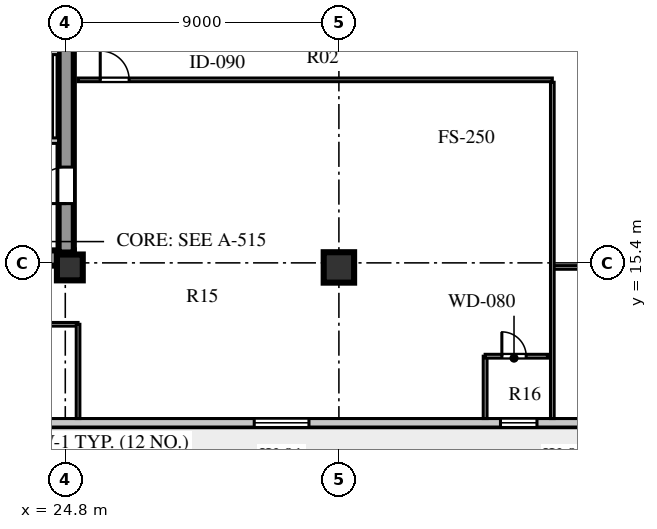
"""IFC4 building model, lengths in metres.
Left out: names, types, materials, properties, quantities, classifications, styles, units other than length and angle.
Written with IfcOpenShell. Run it as: python <this file> out.ifc"""

import sys

from ifc_helpers import new_model, si_unit, direction, frame, frame_2d, origin, origin_2d, place, context, subcontext, project, spatial, rectangle, extrude, element, fill, save


model = new_model("IFC4")
c1 = context("Model", 3, precision=1e-05, world=origin(), true_north=direction((0.0, 1.0)))
c2 = subcontext(c1, "Body", "Model", "MODEL_VIEW")
j1 = project(units=[si_unit("LENGTHUNIT", "METRE"), si_unit("PLANEANGLEUNIT", "RADIAN")], contexts=[c1])
p1 = place(None, origin())
s1 = spatial("IfcSite", under=j1, at=p1, CompositionType="ELEMENT")
p2 = place(p1, origin())
s2 = spatial("IfcBuilding", under=s1, at=p2, CompositionType="ELEMENT")
p3 = place(p2, frame((0.0, 0.0, 111.7)))
s3 = spatial("IfcBuildingStorey", under=s2, at=p3, CompositionType="ELEMENT", Elevation=111.7)
p4 = place(p3, frame((15.4, 15.56, 0.0), z_axis=(0.0, 0.0, 1.0), x_axis=(1.0, 0.0, 0.0)))
e1 = element("IfcWall", 1, at=p4, inside=s3, PredefinedType="SHEAR", context=c2, shape_type="SweptSolid", body=[
    extrude(rectangle(XDim=9.68, YDim=0.5, at=frame_2d((4.84, 0.0))), origin(), (0.0, 0.0, 1.0), 3.6),
])
p5 = place(p3, frame((24.83, 15.74, 0.0), z_axis=(0.0, 0.0, 1.0), x_axis=(0.0, 1.0, 0.0)))
e2 = element("IfcWall", 2, at=p5, inside=s3, PredefinedType="SHEAR", context=c2, shape_type="SweptSolid", body=[
    extrude(rectangle(XDim=25.76, YDim=0.5, at=frame_2d((12.88, 0.0))), origin(), (0.0, 0.0, 1.0), 3.6),
])
p6 = place(p5, frame((1.61, 0.0, 0.0)))
e3 = element("IfcOpeningElement", 3, at=p6, cuts=e2, PredefinedType="OPENING", context=c2, shape_type="SweptSolid", body=[
    extrude(rectangle(XDim=1.2, YDim=2.1, at=frame_2d((0.6, 1.05))), frame((0.0, 0.26, 0.0), z_axis=(0.0, -1.0, 0.0), x_axis=(1.0, 0.0, 0.0)), (0.0, 0.0, 1.0), 0.52),
])
p7 = place(p5, frame((6.78, 0.0, 0.0)))
e4 = element("IfcOpeningElement", 4, at=p7, cuts=e2, PredefinedType="OPENING", context=c2, shape_type="SweptSolid", body=[
    extrude(rectangle(XDim=0.85, YDim=2.06, at=frame_2d((0.425, 1.03))), frame((0.0, 0.26, 0.0), z_axis=(0.0, -1.0, 0.0), x_axis=(1.0, 0.0, 0.0)), (0.0, 0.0, 1.0), 0.52),
])
p8 = place(p5, frame((12.11, 0.0, 0.0)))
e5 = element("IfcOpeningElement", 5, at=p8, cuts=e2, PredefinedType="OPENING", context=c2, shape_type="SweptSolid", body=[
    extrude(rectangle(XDim=1.5, YDim=2.12, at=frame_2d((0.75, 1.06))), frame((0.0, 0.26, 0.0), z_axis=(0.0, -1.0, 0.0), x_axis=(1.0, 0.0, 0.0)), (0.0, 0.0, 1.0), 0.52),
])
p9 = place(p5, frame((20.11, 0.0, 0.0)))
e6 = element("IfcOpeningElement", 6, at=p9, cuts=e2, PredefinedType="OPENING", context=c2, shape_type="SweptSolid", body=[
    extrude(rectangle(XDim=1.2, YDim=2.12, at=frame_2d((0.6, 1.06))), frame((0.0, 0.26, 0.0), z_axis=(0.0, -1.0, 0.0), x_axis=(1.0, 0.0, 0.0)), (0.0, 0.0, 1.0), 0.52),
])
p10 = place(p5, frame((24.01, 0.0, 0.0)))
e7 = element("IfcOpeningElement", 7, at=p10, cuts=e2, PredefinedType="OPENING", context=c2, shape_type="SweptSolid", body=[
    extrude(rectangle(XDim=0.95, YDim=2.1, at=frame_2d((0.475, 1.05))), frame((0.0, 0.26, 0.0), z_axis=(0.0, -1.0, 0.0), x_axis=(1.0, 0.0, 0.0)), (0.0, 0.0, 1.0), 0.52),
])
p11 = place(p3, frame((24.95, 15.25, 0.0), z_axis=(0.0, 0.0, 1.0), x_axis=(1.0, 0.0, 0.0)))
e8 = element("IfcColumn", 8, at=p11, inside=s3, PredefinedType="COLUMN", context=c2, shape_type="SweptSolid", body=[
    extrude(rectangle(XDim=0.85, YDim=0.85, at=origin_2d()), origin(), (0.0, 0.0, 1.0), 3.6),
])
p12 = place(p3, frame((33.8, 15.25, 0.0), z_axis=(0.0, 0.0, 1.0), x_axis=(1.0, 0.0, 0.0)))
e9 = element("IfcColumn", 9, at=p12, inside=s3, PredefinedType="COLUMN", context=c2, shape_type="SweptSolid", body=[
    extrude(rectangle(XDim=1.0, YDim=1.0, at=origin_2d()), origin(), (0.0, 0.0, 1.0), 3.6),
])
p13 = place(p3, frame((13.25, 10.14, 0.0), z_axis=(0.0, 0.0, 1.0), x_axis=(1.0, 0.0, 0.0)))
e10 = element("IfcWall", 10, at=p13, inside=s3, PredefinedType="STANDARD", context=c2, shape_type="SweptSolid", body=[
    extrude(rectangle(XDim=32.1, YDim=0.28, at=frame_2d((16.05, 0.0))), origin(), (0.0, 0.0, 1.0), 3.6),
])
p14 = place(p13, frame((0.95, 0.0, 0.0)))
e11 = element("IfcOpeningElement", 11, at=p14, cuts=e10, PredefinedType="OPENING", context=c2, shape_type="SweptSolid", body=[
    extrude(rectangle(XDim=1.0, YDim=2.05, at=frame_2d((0.5, 1.025))), frame((0.0, 0.15, 0.0), z_axis=(0.0, -1.0, 0.0), x_axis=(1.0, 0.0, 0.0)), (0.0, 0.0, 1.0), 0.3),
])
p15 = place(p13, frame((5.805, 0.0, 0.8)))
e12 = element("IfcOpeningElement", 12, at=p15, cuts=e10, PredefinedType="OPENING", context=c2, shape_type="SweptSolid", body=[
    extrude(rectangle(XDim=2.25, YDim=2.0, at=frame_2d((1.125, 1.0))), frame((0.0, 0.15, 0.0), z_axis=(0.0, -1.0, 0.0), x_axis=(1.0, 0.0, 0.0)), (0.0, 0.0, 1.0), 0.3),
])
p16 = place(p13, frame((17.765, 0.0, 0.8)))
e13 = element("IfcOpeningElement", 13, at=p16, cuts=e10, PredefinedType="OPENING", context=c2, shape_type="SweptSolid", body=[
    extrude(rectangle(XDim=1.8, YDim=2.0, at=frame_2d((0.9, 1.0))), frame((0.0, 0.15, 0.0), z_axis=(0.0, -1.0, 0.0), x_axis=(1.0, 0.0, 0.0)), (0.0, 0.0, 1.0), 0.3),
])
p17 = place(p13, frame((25.865, 0.0, 0.8)))
e14 = element("IfcOpeningElement", 14, at=p17, cuts=e10, PredefinedType="OPENING", context=c2, shape_type="SweptSolid", body=[
    extrude(rectangle(XDim=1.2, YDim=1.75, at=frame_2d((0.6, 0.875))), frame((0.0, 0.15, 0.0), z_axis=(0.0, -1.0, 0.0), x_axis=(1.0, 0.0, 0.0)), (0.0, 0.0, 1.0), 0.3),
])
p18 = place(p13, frame((29.18, 0.0, 0.8)))
e15 = element("IfcOpeningElement", 15, at=p18, cuts=e10, PredefinedType="OPENING", context=c2, shape_type="SweptSolid", body=[
    extrude(rectangle(XDim=1.2, YDim=1.75, at=frame_2d((0.6, 0.875))), frame((0.0, 0.15, 0.0), z_axis=(0.0, -1.0, 0.0), x_axis=(1.0, 0.0, 0.0)), (0.0, 0.0, 1.0), 0.3),
])
p19 = place(p3, frame((19.64, 19.42, 0.0), z_axis=(0.0, 0.0, 1.0), x_axis=(1.0, 0.0, 0.0)))
e16 = element("IfcWall", 16, at=p19, inside=s3, PredefinedType="SOLIDWALL", context=c2, shape_type="SweptSolid", body=[
    extrude(rectangle(XDim=4.94, YDim=0.18, at=frame_2d((2.47, 0.0))), origin(), (0.0, 0.0, 1.0), 3.6),
])
p20 = place(p19, frame((0.72, 0.0, 0.0)))
e17 = element("IfcOpeningElement", 17, at=p20, cuts=e16, PredefinedType="OPENING", context=c2, shape_type="SweptSolid", body=[
    extrude(rectangle(XDim=1.1, YDim=2.1, at=frame_2d((0.55, 1.05))), frame((0.0, 0.1, 0.0), z_axis=(0.0, -1.0, 0.0), x_axis=(1.0, 0.0, 0.0)), (0.0, 0.0, 1.0), 0.2),
])
p21 = place(p19, frame((3.02, 0.0, 0.0)))
e18 = element("IfcOpeningElement", 18, at=p21, cuts=e16, PredefinedType="OPENING", context=c2, shape_type="SweptSolid", body=[
    extrude(rectangle(XDim=1.1, YDim=2.1, at=frame_2d((0.55, 1.05))), frame((0.0, 0.1, 0.0), z_axis=(0.0, -1.0, 0.0), x_axis=(1.0, 0.0, 0.0)), (0.0, 0.0, 1.0), 0.2),
])
p22 = place(p3, frame((19.64, 22.34, 0.0), z_axis=(0.0, 0.0, 1.0), x_axis=(1.0, 0.0, 0.0)))
e19 = element("IfcWall", 19, at=p22, inside=s3, PredefinedType="SOLIDWALL", context=c2, shape_type="SweptSolid", body=[
    extrude(rectangle(XDim=4.94, YDim=0.18, at=frame_2d((2.47, 0.0))), origin(), (0.0, 0.0, 1.0), 3.6),
])
p23 = place(p3, frame((25.22, 21.42, 0.0), z_axis=(0.0, 0.0, 1.0), x_axis=(1.0, 0.0, 0.0)))
e20 = element("IfcWall", 20, at=p23, inside=s3, PredefinedType="PARTITIONING", context=c2, shape_type="SweptSolid", body=[
    extrude(rectangle(XDim=15.6, YDim=0.12, at=frame_2d((7.8, 0.0))), origin(), (0.0, 0.0, 1.0), 3.2),
])
p24 = place(p23, frame((0.73, 0.0, 0.0)))
e21 = element("IfcOpeningElement", 21, at=p24, cuts=e20, PredefinedType="OPENING", context=c2, shape_type="SweptSolid", body=[
    extrude(rectangle(XDim=0.95, YDim=2.1, at=frame_2d((0.475, 1.05))), frame((0.0, 0.07, 0.0), z_axis=(0.0, -1.0, 0.0), x_axis=(1.0, 0.0, 0.0)), (0.0, 0.0, 1.0), 0.14),
])
p25 = place(p3, frame((40.82, 15.25, 0.0), z_axis=(0.0, 0.0, 1.0), x_axis=(1.0, 0.0, 0.0)))
e22 = element("IfcWall", 22, at=p25, inside=s3, PredefinedType="PARTITIONING", context=c2, shape_type="SweptSolid", body=[
    extrude(rectangle(XDim=7.3, YDim=0.12, at=frame_2d((3.65, 0.0))), origin(), (0.0, 0.0, 1.0), 2.95),
])
p26 = place(p3, frame((13.59, 13.38, 0.0), z_axis=(0.0, 0.0, 1.0), x_axis=(1.0, 0.0, 0.0)))
e23 = element("IfcWall", 23, at=p26, inside=s3, PredefinedType="PARTITIONING", context=c2, shape_type="SweptSolid", body=[
    extrude(rectangle(XDim=11.63, YDim=0.12, at=frame_2d((5.815, 0.0))), origin(), (0.0, 0.0, 1.0), 3.6),
])
p27 = place(p26, frame((4.56, 0.0, 0.0)))
e24 = element("IfcOpeningElement", 24, at=p27, cuts=e23, PredefinedType="OPENING", context=c2, shape_type="SweptSolid", body=[
    extrude(rectangle(XDim=1.0, YDim=2.08, at=frame_2d((0.5, 1.04))), frame((0.0, 0.07, 0.0), z_axis=(0.0, -1.0, 0.0), x_axis=(1.0, 0.0, 0.0)), (0.0, 0.0, 1.0), 0.14),
])
p28 = place(p3, frame((25.22, 10.28, 0.0), z_axis=(0.0, 0.0, 1.0), x_axis=(0.0, 1.0, 0.0)))
e25 = element("IfcWall", 25, at=p28, inside=s3, PredefinedType="PARTITIONING", context=c2, shape_type="SweptSolid", body=[
    extrude(rectangle(XDim=3.1, YDim=0.12, at=frame_2d((1.55, 0.0))), origin(), (0.0, 0.0, 1.0), 3.1),
])
p29 = place(p3, frame((40.82, 10.28, 0.0), z_axis=(0.0, 0.0, 1.0), x_axis=(0.0, 1.0, 0.0)))
e26 = element("IfcWall", 26, at=p29, inside=s3, PredefinedType="PARTITIONING", context=c2, shape_type="SweptSolid", body=[
    extrude(rectangle(XDim=11.06, YDim=0.12, at=frame_2d((5.53, 0.0))), origin(), (0.0, 0.0, 1.0), 3.6),
])
p30 = place(p3, frame((38.61, 10.28, 0.0), z_axis=(0.0, 0.0, 1.0), x_axis=(0.0, 1.0, 0.0)))
e27 = element("IfcWall", 27, at=p30, inside=s3, PredefinedType="PLUMBINGWALL", context=c2, shape_type="SweptSolid", body=[
    extrude(rectangle(XDim=2.05, YDim=0.125, at=frame_2d((1.025, 0.0))), origin(), (0.0, 0.0, 1.0), 3.6),
])
p31 = place(p3, frame((38.61, 12.33, 0.0), z_axis=(0.0, 0.0, 1.0), x_axis=(1.0, 0.0, 0.0)))
e28 = element("IfcWall", 28, at=p31, inside=s3, PredefinedType="PLUMBINGWALL", context=c2, shape_type="SweptSolid", body=[
    extrude(rectangle(XDim=2.05, YDim=0.125, at=frame_2d((1.025, 0.0))), origin(), (0.0, 0.0, 1.0), 3.6),
])
p32 = place(p31, frame((0.55, 0.0, 0.0)))
e29 = element("IfcOpeningElement", 29, at=p32, cuts=e28, PredefinedType="OPENING", context=c2, shape_type="SweptSolid", body=[
    extrude(rectangle(XDim=0.8, YDim=2.05, at=frame_2d((0.4, 1.025))), frame((0.0, 0.073, 0.0), z_axis=(0.0, -1.0, 0.0), x_axis=(1.0, 0.0, 0.0)), (0.0, 0.0, 1.0), 0.145),
])
p33 = place(p16, origin())
e30 = element("IfcWindow", 30, at=p33, inside=s3, PartitioningType="SINGLE_PANEL", PredefinedType="WINDOW", context=c2, shape_type="SweptSolid", body=[
    extrude(rectangle(XDim=1.8, YDim=2.0, at=frame_2d((0.9, 1.0))), frame((0.0, 0.03, 0.0), z_axis=(0.0, -1.0, 0.0), x_axis=(1.0, 0.0, 0.0)), (0.0, 0.0, 1.0), 0.06),
])
fill(e13, e30)
p34 = place(p17, origin())
e31 = element("IfcWindow", 31, at=p34, inside=s3, PartitioningType="SINGLE_PANEL", PredefinedType="WINDOW", context=c2, shape_type="SweptSolid", body=[
    extrude(rectangle(XDim=1.2, YDim=1.75, at=frame_2d((0.6, 0.875))), frame((0.0, 0.03, 0.0), z_axis=(0.0, -1.0, 0.0), x_axis=(1.0, 0.0, 0.0)), (0.0, 0.0, 1.0), 0.06),
])
fill(e14, e31)
p35 = place(p6, frame((1.2, 0.0, 0.0), z_axis=(0.0, 0.0, 1.0), x_axis=(-1.0, 0.0, 0.0)))
e32 = element("IfcDoor", 32, at=p35, inside=s3, OperationType="SINGLE_SWING_RIGHT", PredefinedType="DOOR", context=c2, shape_type="SweptSolid", body=[
    extrude(rectangle(XDim=1.2, YDim=2.1, at=frame_2d((0.6, 1.05))), frame((0.0, 0.025, 0.0), z_axis=(0.0, -1.0, 0.0), x_axis=(1.0, 0.0, 0.0)), (0.0, 0.0, 1.0), 0.05),
])
fill(e3, e32)
p36 = place(p24, frame((0.95, 0.0, 0.0), z_axis=(0.0, 0.0, 1.0), x_axis=(-1.0, 0.0, 0.0)))
e33 = element("IfcDoor", 33, at=p36, inside=s3, OperationType="SINGLE_SWING_RIGHT", PredefinedType="DOOR", context=c2, shape_type="SweptSolid", body=[
    extrude(rectangle(XDim=0.95, YDim=2.1, at=frame_2d((0.475, 1.05))), frame((0.0, 0.025, 0.0), z_axis=(0.0, -1.0, 0.0), x_axis=(1.0, 0.0, 0.0)), (0.0, 0.0, 1.0), 0.05),
])
fill(e21, e33)
p37 = place(p32, origin())
e34 = element("IfcDoor", 34, at=p37, inside=s3, OperationType="SINGLE_SWING_LEFT", PredefinedType="DOOR", context=c2, shape_type="SweptSolid", body=[
    extrude(rectangle(XDim=0.8, YDim=2.05, at=frame_2d((0.4, 1.025))), frame((0.0, 0.025, 0.0), z_axis=(0.0, -1.0, 0.0), x_axis=(1.0, 0.0, 0.0)), (0.0, 0.0, 1.0), 0.05),
])
fill(e29, e34)
save(model, sys.argv[1])
